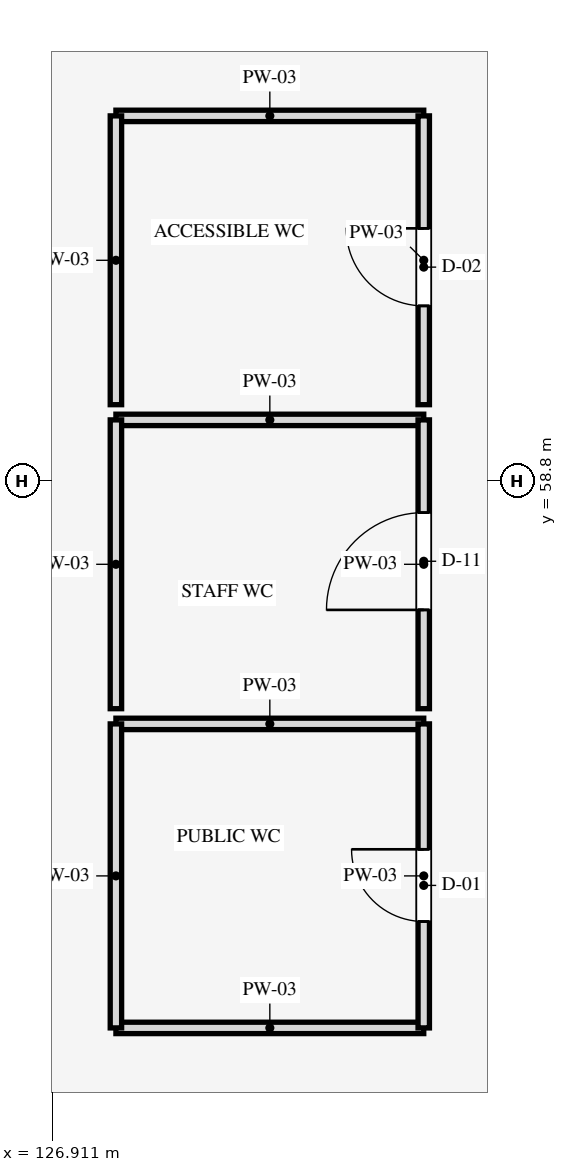
"""IFC4 building model, lengths in metres.
Left out: names, types, materials, properties, quantities, classifications, styles, units other than length and angle.
Written with IfcOpenShell. Run it as: python <this file> out.ifc"""

import sys

from ifc_helpers import new_model, si_unit, direction, frame, frame_2d, origin, place, context, subcontext, project, spatial, rectangle, extrude, element, fill, save


model = new_model("IFC4")
c1 = context("Model", 3, precision=1e-05, world=origin(), true_north=direction((0.0, 1.0)))
c2 = subcontext(c1, "Body", "Model", "MODEL_VIEW")
j1 = project(units=[si_unit("LENGTHUNIT", "METRE"), si_unit("PLANEANGLEUNIT", "RADIAN")], contexts=[c1])
p1 = place(None, origin())
s1 = spatial("IfcSite", under=j1, at=p1, CompositionType="ELEMENT")
p2 = place(p1, origin())
s2 = spatial("IfcBuilding", under=s1, at=p2, CompositionType="ELEMENT")
p3 = place(p2, origin())
s3 = spatial("IfcBuildingStorey", under=s2, at=p3, CompositionType="ELEMENT", Elevation=0.0)
for number, where, z_axis, x_axis in (
    (1, (127.75, 51.6, 0.0), (0.0, 0.0, 1.0), (1.0, 0.0, 0.0)),
    (2, (127.75, 55.6, 0.0), (0.0, 0.0, 1.0), (1.0, 0.0, 0.0)),
):
    element("IfcWall", number, at=place(p3, frame(where, z_axis=z_axis, x_axis=x_axis)), inside=s3, PredefinedType="PARTITIONING", context=c2, shape_type="SweptSolid", body=[
        extrude(rectangle(XDim=4.05, YDim=0.15, at=frame_2d((2.025, 0.0))), origin(), (0.0, 0.0, 1.0), 4.44),
    ])
p4 = place(p3, frame((127.75, 51.6, 0.0), z_axis=(0.0, 0.0, 1.0), x_axis=(0.0, 1.0, 0.0)))
e3 = element("IfcWall", 3, at=p4, inside=s3, PredefinedType="PARTITIONING", context=c2, shape_type="SweptSolid", body=[
    extrude(rectangle(XDim=4.0, YDim=0.15, at=frame_2d((2.0, 0.0))), origin(), (0.0, 0.0, 1.0), 4.44),
])
p5 = place(p3, frame((131.8, 51.6, 0.0), z_axis=(0.0, 0.0, 1.0), x_axis=(0.0, 1.0, 0.0)))
e4 = element("IfcWall", 4, at=p5, inside=s3, PredefinedType="PARTITIONING", context=c2, shape_type="SweptSolid", body=[
    extrude(rectangle(XDim=4.0, YDim=0.15, at=frame_2d((2.0, 0.0))), origin(), (0.0, 0.0, 1.0), 4.44),
])
p6 = place(p5, frame((1.4, 0.0, 0.0)))
e5 = element("IfcOpeningElement", 5, at=p6, cuts=e4, PredefinedType="OPENING", context=c2, shape_type="SweptSolid", body=[
    extrude(rectangle(XDim=0.95, YDim=2.1, at=frame_2d((0.475, 1.05))), frame((0.0, 0.085, 0.0), z_axis=(0.0, -1.0, 0.0), x_axis=(1.0, 0.0, 0.0)), (0.0, 0.0, 1.0), 0.17),
])
p7 = place(p3, frame((127.75, 59.6, 0.0), z_axis=(0.0, 0.0, 1.0), x_axis=(1.0, 0.0, 0.0)))
e6 = element("IfcWall", 6, at=p7, inside=s3, PredefinedType="PARTITIONING", context=c2, shape_type="SweptSolid", body=[
    extrude(rectangle(XDim=4.05, YDim=0.15, at=frame_2d((2.025, 0.0))), origin(), (0.0, 0.0, 1.0), 4.44),
])
p8 = place(p3, frame((127.75, 55.8, 0.0), z_axis=(0.0, 0.0, 1.0), x_axis=(0.0, 1.0, 0.0)))
e7 = element("IfcWall", 7, at=p8, inside=s3, PredefinedType="PARTITIONING", context=c2, shape_type="SweptSolid", body=[
    extrude(rectangle(XDim=3.8, YDim=0.15, at=frame_2d((1.9, 0.0))), origin(), (0.0, 0.0, 1.0), 4.44),
])
p9 = place(p3, frame((131.8, 55.8, 0.0), z_axis=(0.0, 0.0, 1.0), x_axis=(0.0, 1.0, 0.0)))
e8 = element("IfcWall", 8, at=p9, inside=s3, PredefinedType="PARTITIONING", context=c2, shape_type="SweptSolid", body=[
    extrude(rectangle(XDim=3.8, YDim=0.15, at=frame_2d((1.9, 0.0))), origin(), (0.0, 0.0, 1.0), 4.44),
])
p10 = place(p9, frame((1.3, 0.0, 0.0)))
e9 = element("IfcOpeningElement", 9, at=p10, cuts=e8, PredefinedType="OPENING", context=c2, shape_type="SweptSolid", body=[
    extrude(rectangle(XDim=1.28, YDim=2.16, at=frame_2d((0.64, 1.08))), frame((0.0, 0.085, 0.0), z_axis=(0.0, -1.0, 0.0), x_axis=(1.0, 0.0, 0.0)), (0.0, 0.0, 1.0), 0.17),
])
p11 = place(p3, frame((127.75, 63.6, 0.0), z_axis=(0.0, 0.0, 1.0), x_axis=(1.0, 0.0, 0.0)))
e10 = element("IfcWall", 10, at=p11, inside=s3, PredefinedType="PARTITIONING", context=c2, shape_type="SweptSolid", body=[
    extrude(rectangle(XDim=4.05, YDim=0.15, at=frame_2d((2.025, 0.0))), origin(), (0.0, 0.0, 1.0), 4.44),
])
p12 = place(p3, frame((127.75, 59.8, 0.0), z_axis=(0.0, 0.0, 1.0), x_axis=(0.0, 1.0, 0.0)))
e11 = element("IfcWall", 11, at=p12, inside=s3, PredefinedType="PARTITIONING", context=c2, shape_type="SweptSolid", body=[
    extrude(rectangle(XDim=3.8, YDim=0.15, at=frame_2d((1.9, 0.0))), origin(), (0.0, 0.0, 1.0), 4.44),
])
p13 = place(p3, frame((131.8, 59.8, 0.0), z_axis=(0.0, 0.0, 1.0), x_axis=(0.0, 1.0, 0.0)))
e12 = element("IfcWall", 12, at=p13, inside=s3, PredefinedType="PARTITIONING", context=c2, shape_type="SweptSolid", body=[
    extrude(rectangle(XDim=3.8, YDim=0.15, at=frame_2d((1.9, 0.0))), origin(), (0.0, 0.0, 1.0), 4.44),
])
p14 = place(p13, frame((1.3, 0.0, 0.0)))
e13 = element("IfcOpeningElement", 13, at=p14, cuts=e12, PredefinedType="OPENING", context=c2, shape_type="SweptSolid", body=[
    extrude(rectangle(XDim=1.02, YDim=2.1, at=frame_2d((0.51, 1.05))), frame((0.0, 0.085, 0.0), z_axis=(0.0, -1.0, 0.0), x_axis=(1.0, 0.0, 0.0)), (0.0, 0.0, 1.0), 0.17),
])
p15 = place(p6, origin())
e14 = element("IfcDoor", 14, at=p15, inside=s3, OperationType="SINGLE_SWING_RIGHT", PredefinedType="DOOR", context=c2, shape_type="SweptSolid", body=[
    extrude(rectangle(XDim=0.95, YDim=2.1, at=frame_2d((0.475, 1.05))), frame((0.0, 0.025, 0.0), z_axis=(0.0, -1.0, 0.0), x_axis=(1.0, 0.0, 0.0)), (0.0, 0.0, 1.0), 0.05),
])
fill(e5, e14)
p16 = place(p10, origin())
e15 = element("IfcDoor", 15, at=p16, inside=s3, OperationType="SINGLE_SWING_LEFT", PredefinedType="DOOR", context=c2, shape_type="SweptSolid", body=[
    extrude(rectangle(XDim=1.28, YDim=2.16, at=frame_2d((0.64, 1.08))), frame((0.0, 0.025, 0.0), z_axis=(0.0, -1.0, 0.0), x_axis=(1.0, 0.0, 0.0)), (0.0, 0.0, 1.0), 0.05),
])
fill(e9, e15)
p17 = place(p14, origin())
e16 = element("IfcDoor", 16, at=p17, inside=s3, OperationType="SINGLE_SWING_RIGHT", PredefinedType="DOOR", context=c2, shape_type="SweptSolid", body=[
    extrude(rectangle(XDim=1.02, YDim=2.1, at=frame_2d((0.51, 1.05))), frame((0.0, 0.025, 0.0), z_axis=(0.0, -1.0, 0.0), x_axis=(1.0, 0.0, 0.0)), (0.0, 0.0, 1.0), 0.05),
])
fill(e13, e16)
save(model, sys.argv[1])
